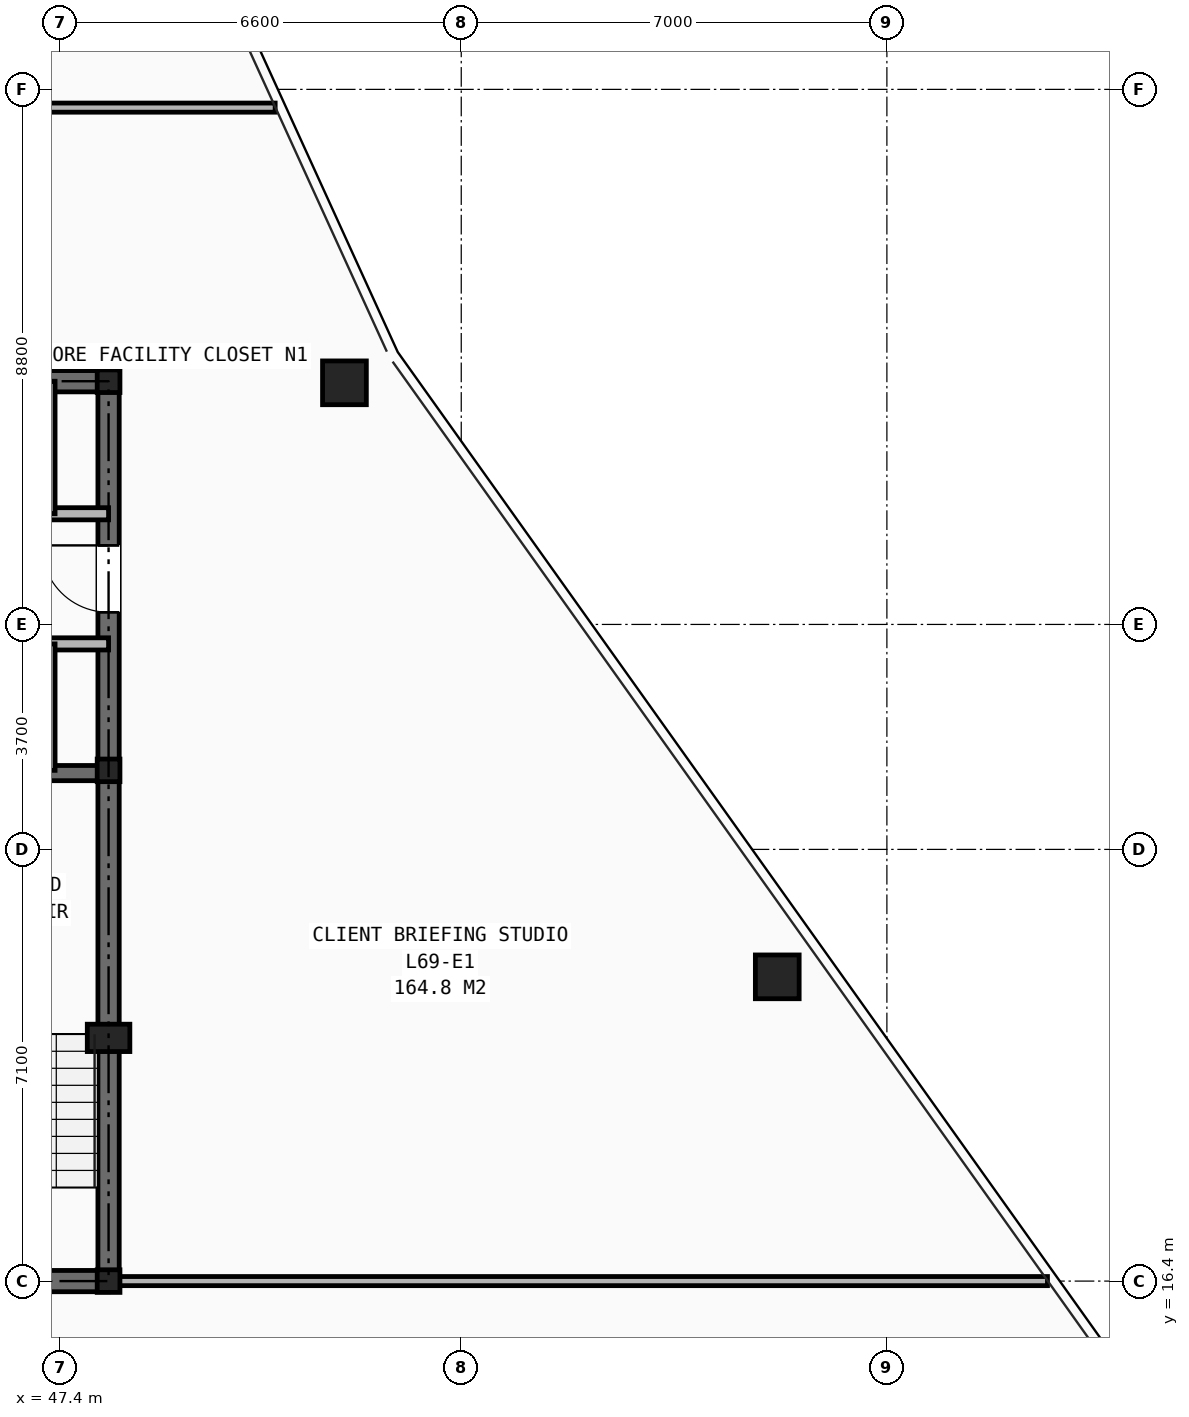
"""IFC4 building model, lengths in metres.
Left out: names, types, materials, properties, quantities, classifications, styles, units other than length and angle.
Written with IfcOpenShell. Run it as: python <this file> out.ifc"""

import sys

from ifc_helpers import new_model, si_unit, direction, frame, frame_2d, origin, origin_2d, place, context, subcontext, project, spatial, rectangle, hollow_rectangle, i_section, extrude, element, fill, save


model = new_model("IFC4")
c1 = context("Model", 3, precision=1e-05, world=origin(), true_north=direction((0.0, 1.0)))
c2 = subcontext(c1, "Body", "Model", "MODEL_VIEW")
j1 = project(units=[si_unit("LENGTHUNIT", "METRE"), si_unit("PLANEANGLEUNIT", "RADIAN")], contexts=[c1])
p1 = place(None, origin())
s1 = spatial("IfcSite", under=j1, at=p1, CompositionType="ELEMENT")
p2 = place(p1, origin())
s2 = spatial("IfcBuilding", under=s1, at=p2, CompositionType="ELEMENT")
p3 = place(p2, frame((0.0, 0.0, 243.4)))
s3 = spatial("IfcBuildingStorey", under=s2, at=p3, CompositionType="ELEMENT", Elevation=243.4)
for number, where, z_axis, x_axis in (
    (1, (48.2, 16.4, 0.0), (0.0, 0.0, 1.0), (1.0, 0.0, 0.0)),
    (2, (48.2, 24.8, 0.0), (0.0, 0.0, 1.0), (1.0, 0.0, 0.0)),
    (3, (48.2, 31.2, 0.0), (0.0, 0.0, 1.0), (1.0, 0.0, 0.0)),
):
    element("IfcColumn", number, at=place(p3, frame(where, z_axis=z_axis, x_axis=x_axis)), inside=s3, PredefinedType="COLUMN", context=c2, shape_type="SweptSolid", body=[
        extrude(i_section(OverallWidth=0.374, OverallDepth=0.372, WebThickness=0.016, FlangeThickness=0.026, at=origin_2d()), origin(), (0.0, 0.0, 1.0), 3.5),
    ])
p4 = place(p3, frame((48.2, 20.4, 0.0), z_axis=(0.0, 0.0, 1.0), x_axis=(1.0, 0.0, 0.0)))
e4 = element("IfcColumn", 4, at=p4, inside=s3, PredefinedType="PILASTER", context=c2, shape_type="SweptSolid", body=[
    extrude(rectangle(XDim=0.7, YDim=0.45, at=origin_2d()), origin(), (0.0, 0.0, 1.0), 3.5),
])
for number, where, z_axis, x_axis in (
    (5, (59.197, 21.404, 0.0), (0.0, 0.0, 1.0), (1.0, 0.0, 0.0)),
    (6, (52.079, 31.174, 0.0), (0.0, 0.0, 1.0), (1.0, 0.0, 0.0)),
):
    element("IfcColumn", number, at=place(p3, frame(where, z_axis=z_axis, x_axis=x_axis)), inside=s3, PredefinedType="COLUMN", context=c2, shape_type="SweptSolid", body=[
        extrude(hollow_rectangle(XDim=0.72, YDim=0.72, WallThickness=0.05, at=origin_2d()), origin(), (0.0, 0.0, 1.0), 3.5),
    ])
p5 = place(p3, frame((31.8, 16.4, 0.0), z_axis=(0.0, 0.0, 1.0), x_axis=(1.0, 0.0, 0.0)))
e7 = element("IfcWall", 7, at=p5, inside=s3, PredefinedType="SHEAR", context=c2, shape_type="SweptSolid", body=[
    extrude(rectangle(XDim=16.4, YDim=0.35, at=frame_2d((8.2, 0.0))), origin(), (0.0, 0.0, 1.0), 3.25),
])
p6 = place(p5, frame((7.75, 0.0, 0.0)))
e8 = element("IfcOpeningElement", 8, at=p6, cuts=e7, PredefinedType="OPENING", context=c2, shape_type="SweptSolid", body=[
    extrude(rectangle(XDim=0.9, YDim=2.1, at=frame_2d((0.45, 1.05))), frame((0.0, 0.185, 0.0), z_axis=(0.0, -1.0, 0.0), x_axis=(1.0, 0.0, 0.0)), (0.0, 0.0, 1.0), 0.37),
])
p7 = place(p5, frame((4.2, 0.0, 0.0)))
e9 = element("IfcOpeningElement", 9, at=p7, cuts=e7, PredefinedType="OPENING", context=c2, shape_type="SweptSolid", body=[
    extrude(rectangle(XDim=0.95, YDim=2.1, at=frame_2d((0.475, 1.05))), frame((0.0, 0.185, 0.0), z_axis=(0.0, -1.0, 0.0), x_axis=(1.0, 0.0, 0.0)), (0.0, 0.0, 1.0), 0.37),
])
p8 = place(p5, frame((10.6, 0.0, 0.0)))
e10 = element("IfcOpeningElement", 10, at=p8, cuts=e7, PredefinedType="OPENING", context=c2, shape_type="SweptSolid", body=[
    extrude(rectangle(XDim=0.95, YDim=2.1, at=frame_2d((0.475, 1.05))), frame((0.0, 0.185, 0.0), z_axis=(0.0, -1.0, 0.0), x_axis=(1.0, 0.0, 0.0)), (0.0, 0.0, 1.0), 0.37),
])
p9 = place(p3, frame((31.8, 31.2, 0.0), z_axis=(0.0, 0.0, 1.0), x_axis=(1.0, 0.0, 0.0)))
e11 = element("IfcWall", 11, at=p9, inside=s3, PredefinedType="SHEAR", context=c2, shape_type="SweptSolid", body=[
    extrude(rectangle(XDim=16.4, YDim=0.35, at=frame_2d((8.2, 0.0))), origin(), (0.0, 0.0, 1.0), 3.25),
])
p10 = place(p3, frame((48.2, 16.4, 0.0), z_axis=(0.0, 0.0, 1.0), x_axis=(0.0, 1.0, 0.0)))
e12 = element("IfcWall", 12, at=p10, inside=s3, PredefinedType="SHEAR", context=c2, shape_type="SweptSolid", body=[
    extrude(rectangle(XDim=14.8, YDim=0.35, at=frame_2d((7.4, 0.0))), origin(), (0.0, 0.0, 1.0), 3.25),
])
p11 = place(p10, frame((11.0, 0.0, 0.0)))
e13 = element("IfcOpeningElement", 13, at=p11, cuts=e12, PredefinedType="OPENING", context=c2, shape_type="SweptSolid", body=[
    extrude(rectangle(XDim=1.1, YDim=2.15, at=frame_2d((0.55, 1.075))), frame((0.0, 0.185, 0.0), z_axis=(0.0, -1.0, 0.0), x_axis=(1.0, 0.0, 0.0)), (0.0, 0.0, 1.0), 0.37),
])
p12 = place(p3, frame((44.955, 24.755, 0.0), z_axis=(0.0, 0.0, 1.0), x_axis=(1.0, 0.0, 0.0)))
e14 = element("IfcWall", 14, at=p12, inside=s3, PredefinedType="SHEAR", context=c2, shape_type="SweptSolid", body=[
    extrude(rectangle(XDim=3.245, YDim=0.25, at=frame_2d((1.623, 0.0))), origin(), (0.0, 0.0, 1.0), 3.25),
])
p13 = place(p3, frame((33.82, 29.02, 0.0), z_axis=(0.0, 0.0, 1.0), x_axis=(1.0, 0.0, 0.0)))
e15 = element("IfcWall", 15, at=p13, inside=s3, PredefinedType="SOLIDWALL", context=c2, shape_type="SweptSolid", body=[
    extrude(rectangle(XDim=14.38, YDim=0.2, at=frame_2d((7.19, 0.0))), origin(), (0.0, 0.0, 1.0), 2.705),
])
p14 = place(p13, frame((1.78, 0.0, 0.0)))
e16 = element("IfcOpeningElement", 16, at=p14, cuts=e15, PredefinedType="OPENING", context=c2, shape_type="SweptSolid", body=[
    extrude(rectangle(XDim=0.9, YDim=2.1, at=frame_2d((0.45, 1.05))), frame((0.0, 0.11, 0.0), z_axis=(0.0, -1.0, 0.0), x_axis=(1.0, 0.0, 0.0)), (0.0, 0.0, 1.0), 0.22),
])
p15 = place(p13, frame((6.07, 0.0, 0.0)))
e17 = element("IfcOpeningElement", 17, at=p15, cuts=e15, PredefinedType="OPENING", context=c2, shape_type="SweptSolid", body=[
    extrude(rectangle(XDim=0.9, YDim=2.1, at=frame_2d((0.45, 1.05))), frame((0.0, 0.11, 0.0), z_axis=(0.0, -1.0, 0.0), x_axis=(1.0, 0.0, 0.0)), (0.0, 0.0, 1.0), 0.22),
])
p16 = place(p13, frame((9.39, 0.0, 0.0)))
e18 = element("IfcOpeningElement", 18, at=p16, cuts=e15, PredefinedType="OPENING", context=c2, shape_type="SweptSolid", body=[
    extrude(rectangle(XDim=1.1, YDim=2.15, at=frame_2d((0.55, 1.075))), frame((0.0, 0.11, 0.0), z_axis=(0.0, -1.0, 0.0), x_axis=(1.0, 0.0, 0.0)), (0.0, 0.0, 1.0), 0.22),
])
p17 = place(p13, frame((11.71, 0.0, 0.0)))
e19 = element("IfcOpeningElement", 19, at=p17, cuts=e15, PredefinedType="OPENING", context=c2, shape_type="SweptSolid", body=[
    extrude(rectangle(XDim=1.1, YDim=2.15, at=frame_2d((0.55, 1.075))), frame((0.0, 0.11, 0.0), z_axis=(0.0, -1.0, 0.0), x_axis=(1.0, 0.0, 0.0)), (0.0, 0.0, 1.0), 0.22),
])
p18 = place(p3, frame((31.8, 26.88, 0.0), z_axis=(0.0, 0.0, 1.0), x_axis=(1.0, 0.0, 0.0)))
e20 = element("IfcWall", 20, at=p18, inside=s3, PredefinedType="SOLIDWALL", context=c2, shape_type="SweptSolid", body=[
    extrude(rectangle(XDim=16.4, YDim=0.2, at=frame_2d((8.2, 0.0))), origin(), (0.0, 0.0, 1.0), 2.705),
])
p19 = place(p18, frame((0.55, 0.0, 0.0)))
e21 = element("IfcOpeningElement", 21, at=p19, cuts=e20, PredefinedType="OPENING", context=c2, shape_type="SweptSolid", body=[
    extrude(rectangle(XDim=0.85, YDim=2.05, at=frame_2d((0.425, 1.025))), frame((0.0, 0.11, 0.0), z_axis=(0.0, -1.0, 0.0), x_axis=(1.0, 0.0, 0.0)), (0.0, 0.0, 1.0), 0.22),
])
p20 = place(p18, frame((5.94, 0.0, 0.0)))
e22 = element("IfcOpeningElement", 22, at=p20, cuts=e20, PredefinedType="OPENING", context=c2, shape_type="SweptSolid", body=[
    extrude(rectangle(XDim=0.9, YDim=2.1, at=frame_2d((0.45, 1.05))), frame((0.0, 0.11, 0.0), z_axis=(0.0, -1.0, 0.0), x_axis=(1.0, 0.0, 0.0)), (0.0, 0.0, 1.0), 0.22),
])
p21 = place(p18, frame((11.41, 0.0, 0.0)))
e23 = element("IfcOpeningElement", 23, at=p21, cuts=e20, PredefinedType="OPENING", context=c2, shape_type="SweptSolid", body=[
    extrude(rectangle(XDim=1.1, YDim=2.15, at=frame_2d((0.55, 1.075))), frame((0.0, 0.11, 0.0), z_axis=(0.0, -1.0, 0.0), x_axis=(1.0, 0.0, 0.0)), (0.0, 0.0, 1.0), 0.22),
])
p22 = place(p18, frame((13.73, 0.0, 0.0)))
e24 = element("IfcOpeningElement", 24, at=p22, cuts=e20, PredefinedType="OPENING", context=c2, shape_type="SweptSolid", body=[
    extrude(rectangle(XDim=1.1, YDim=2.15, at=frame_2d((0.55, 1.075))), frame((0.0, 0.11, 0.0), z_axis=(0.0, -1.0, 0.0), x_axis=(1.0, 0.0, 0.0)), (0.0, 0.0, 1.0), 0.22),
])
p23 = place(p3, frame((47.24, 29.02, 0.0), z_axis=(0.0, 0.0, 1.0), x_axis=(0.0, 1.0, 0.0)))
e25 = element("IfcWall", 25, at=p23, inside=s3, PredefinedType="SOLIDWALL", context=c2, shape_type="SweptSolid", body=[
    extrude(rectangle(XDim=2.18, YDim=0.16, at=frame_2d((1.09, 0.0))), origin(), (0.0, 0.0, 1.0), 2.705),
])
p24 = place(p3, frame((47.24, 24.8, 0.0), z_axis=(0.0, 0.0, 1.0), x_axis=(0.0, 1.0, 0.0)))
e26 = element("IfcWall", 26, at=p24, inside=s3, PredefinedType="SOLIDWALL", context=c2, shape_type="SweptSolid", body=[
    extrude(rectangle(XDim=2.08, YDim=0.16, at=frame_2d((1.04, 0.0))), origin(), (0.0, 0.0, 1.0), 3.25),
])
p25 = place(p3, frame((48.2, 16.4, 0.0), z_axis=(0.0, 0.0, 1.0), x_axis=(1.0, 0.0, 0.0)))
e27 = element("IfcWall", 27, at=p25, inside=s3, PredefinedType="PARTITIONING", context=c2, shape_type="SweptSolid", body=[
    extrude(rectangle(XDim=15.441, YDim=0.15, at=frame_2d((7.72, 0.0))), origin(), (0.0, 0.0, 1.0), 2.292),
])
p26 = place(p3, frame((46.8, 35.7, 0.0), z_axis=(0.0, 0.0, 1.0), x_axis=(1.0, 0.0, 0.0)))
e28 = element("IfcWall", 28, at=p26, inside=s3, PredefinedType="PARTITIONING", context=c2, shape_type="SweptSolid", body=[
    extrude(rectangle(XDim=4.14, YDim=0.15, at=frame_2d((2.07, 0.0))), origin(), (0.0, 0.0, 1.0), 2.628),
])
p27 = place(p11, origin())
e29 = element("IfcDoor", 29, at=p27, inside=s3, OperationType="SINGLE_SWING_RIGHT", PredefinedType="DOOR", context=c2, shape_type="SweptSolid", body=[
    extrude(rectangle(XDim=1.1, YDim=2.15, at=frame_2d((0.55, 1.075))), frame((0.0, 0.025, 0.0), z_axis=(0.0, -1.0, 0.0), x_axis=(1.0, 0.0, 0.0)), (0.0, 0.0, 1.0), 0.05),
])
fill(e13, e29)
save(model, sys.argv[1])
